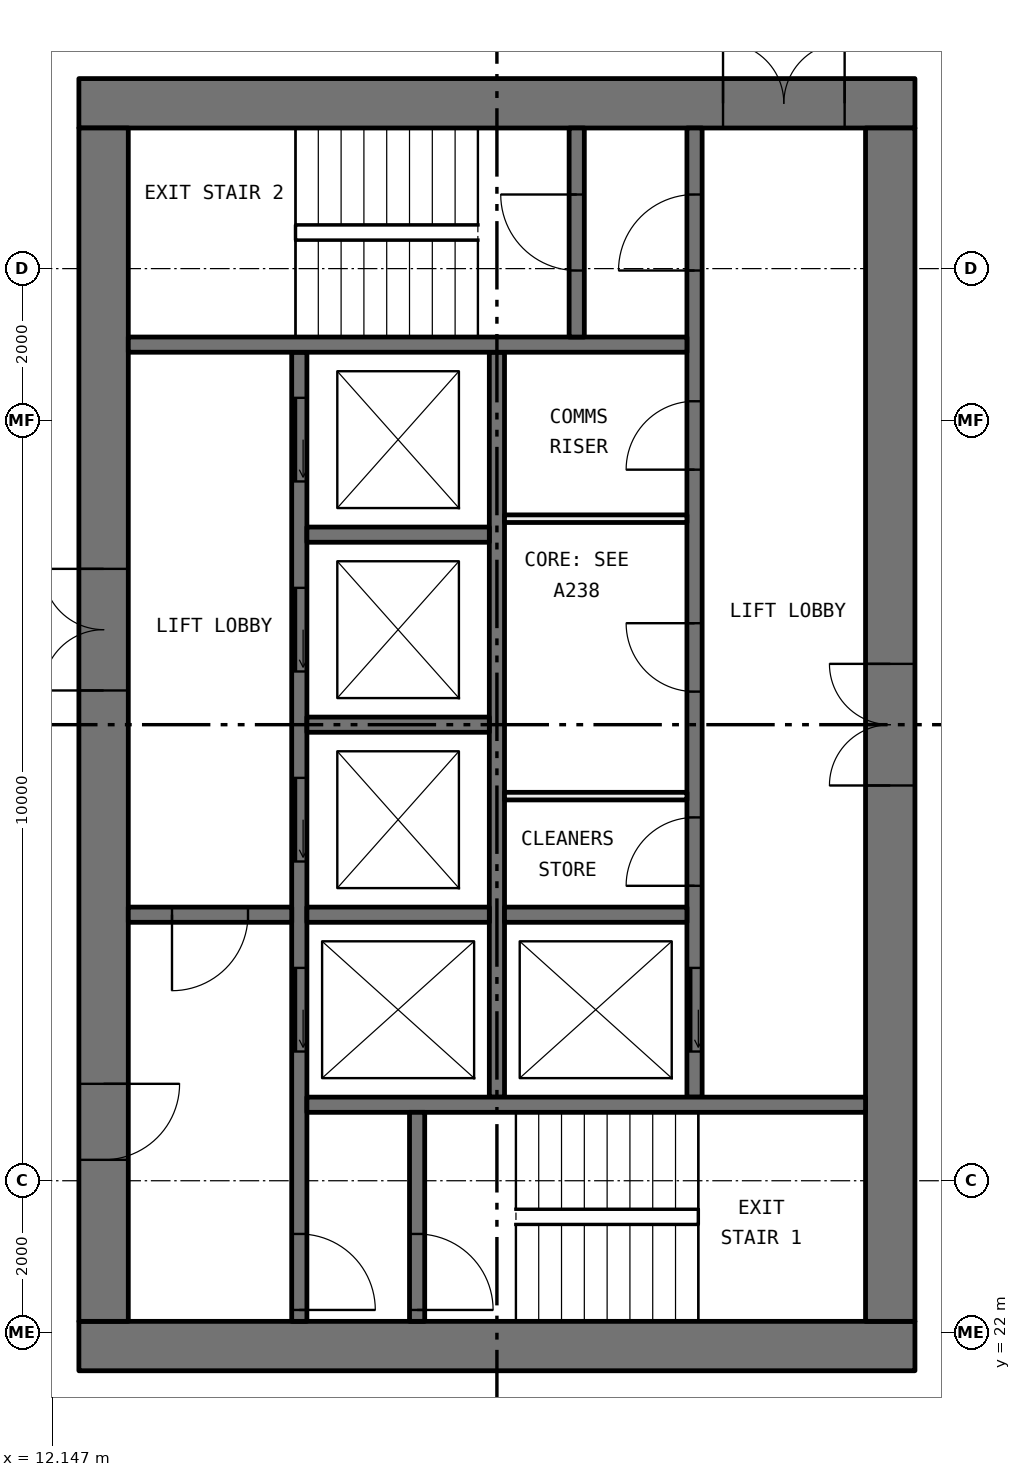
"""IFC4 building model, lengths in metres.
Left out: names, types, materials, properties, quantities, classifications, styles, units other than length and angle.
Written with IfcOpenShell. Run it as: python <this file> out.ifc"""

import sys

from ifc_helpers import new_model, si_unit, direction, frame, frame_2d, origin, place, context, subcontext, project, spatial, rectangle, extrude, element, fill, save


model = new_model("IFC4")
c1 = context("Model", 3, precision=1e-05, world=origin(), true_north=direction((0.0, 1.0)))
c2 = subcontext(c1, "Body", "Model", "MODEL_VIEW")
j1 = project(units=[si_unit("LENGTHUNIT", "METRE"), si_unit("PLANEANGLEUNIT", "RADIAN")], contexts=[c1])
p1 = place(None, origin())
s1 = spatial("IfcSite", under=j1, at=p1, CompositionType="ELEMENT")
p2 = place(p1, origin())
s2 = spatial("IfcBuilding", under=s1, at=p2, CompositionType="ELEMENT")
p3 = place(p2, frame((0.0, 0.0, 141.45)))
s3 = spatial("IfcBuildingStorey", under=s2, at=p3, CompositionType="ELEMENT", Elevation=141.45)
p4 = place(p3, frame((12.5, 21.825, 0.0), z_axis=(0.0, 0.0, 1.0), x_axis=(1.0, 0.0, 0.0)))
e1 = element("IfcWall", 1, at=p4, inside=s3, PredefinedType="SHEAR", context=c2, shape_type="SweptSolid", body=[
    extrude(rectangle(XDim=11.0, YDim=0.65, at=frame_2d((5.5, 0.0))), origin(), (0.0, 0.0, 1.0), 3.05),
])
p5 = place(p3, frame((12.5, 38.175, 0.0), z_axis=(0.0, 0.0, 1.0), x_axis=(1.0, 0.0, 0.0)))
e2 = element("IfcWall", 2, at=p5, inside=s3, PredefinedType="SHEAR", context=c2, shape_type="SweptSolid", body=[
    extrude(rectangle(XDim=11.0, YDim=0.65, at=frame_2d((5.5, 0.0))), origin(), (0.0, 0.0, 1.0), 3.05),
])
p6 = place(p5, frame((8.475, 0.0, 0.0)))
e3 = element("IfcOpeningElement", 3, at=p6, cuts=e2, PredefinedType="OPENING", context=c2, shape_type="SweptSolid", body=[
    extrude(rectangle(XDim=1.6, YDim=2.1, at=frame_2d((0.8, 1.05))), frame((0.0, 0.335, 0.0), z_axis=(0.0, -1.0, 0.0), x_axis=(1.0, 0.0, 0.0)), (0.0, 0.0, 1.0), 0.67),
])
p7 = place(p3, frame((12.825, 22.15, 0.0), z_axis=(0.0, 0.0, 1.0), x_axis=(0.0, 1.0, 0.0)))
e4 = element("IfcWall", 4, at=p7, inside=s3, PredefinedType="SHEAR", context=c2, shape_type="SweptSolid", body=[
    extrude(rectangle(XDim=15.7, YDim=0.65, at=frame_2d((7.85, 0.0))), origin(), (0.0, 0.0, 1.0), 3.05),
])
p8 = place(p7, frame((8.3, 0.0, 0.0)))
e5 = element("IfcOpeningElement", 5, at=p8, cuts=e4, PredefinedType="OPENING", context=c2, shape_type="SweptSolid", body=[
    extrude(rectangle(XDim=1.6, YDim=2.1, at=frame_2d((0.8, 1.05))), frame((0.0, 0.335, 0.0), z_axis=(0.0, -1.0, 0.0), x_axis=(1.0, 0.0, 0.0)), (0.0, 0.0, 1.0), 0.67),
])
p9 = place(p7, frame((2.125, 0.0, 0.0)))
e6 = element("IfcOpeningElement", 6, at=p9, cuts=e4, PredefinedType="OPENING", context=c2, shape_type="SweptSolid", body=[
    extrude(rectangle(XDim=1.0, YDim=2.1, at=frame_2d((0.5, 1.05))), frame((0.0, 0.335, 0.0), z_axis=(0.0, -1.0, 0.0), x_axis=(1.0, 0.0, 0.0)), (0.0, 0.0, 1.0), 0.67),
])
p10 = place(p3, frame((23.175, 22.15, 0.0), z_axis=(0.0, 0.0, 1.0), x_axis=(0.0, 1.0, 0.0)))
e7 = element("IfcWall", 7, at=p10, inside=s3, PredefinedType="SHEAR", context=c2, shape_type="SweptSolid", body=[
    extrude(rectangle(XDim=15.7, YDim=0.65, at=frame_2d((7.85, 0.0))), origin(), (0.0, 0.0, 1.0), 3.05),
])
p11 = place(p10, frame((7.05, 0.0, 0.0)))
e8 = element("IfcOpeningElement", 8, at=p11, cuts=e7, PredefinedType="OPENING", context=c2, shape_type="SweptSolid", body=[
    extrude(rectangle(XDim=1.6, YDim=2.1, at=frame_2d((0.8, 1.05))), frame((0.0, 0.335, 0.0), z_axis=(0.0, -1.0, 0.0), x_axis=(1.0, 0.0, 0.0)), (0.0, 0.0, 1.0), 0.67),
])
p12 = place(p3, frame((15.4, 22.15, 0.0), z_axis=(0.0, 0.0, 1.0), x_axis=(0.0, 1.0, 0.0)))
e9 = element("IfcWall", 9, at=p12, inside=s3, PredefinedType="SOLIDWALL", context=c2, shape_type="SweptSolid", body=[
    extrude(rectangle(XDim=12.75, YDim=0.2, at=frame_2d((6.375, 0.0))), origin(), (0.0, 0.0, 1.0), 3.05),
])
p13 = place(p12, frame((3.55, 0.0, 0.0)))
e10 = element("IfcOpeningElement", 10, at=p13, cuts=e9, PredefinedType="OPENING", context=c2, shape_type="SweptSolid", body=[
    extrude(rectangle(XDim=1.1, YDim=2.1, at=frame_2d((0.55, 1.05))), frame((0.0, 0.11, 0.0), z_axis=(0.0, -1.0, 0.0), x_axis=(1.0, 0.0, 0.0)), (0.0, 0.0, 1.0), 0.22),
])
p14 = place(p12, frame((6.05, 0.0, 0.0)))
e11 = element("IfcOpeningElement", 11, at=p14, cuts=e9, PredefinedType="OPENING", context=c2, shape_type="SweptSolid", body=[
    extrude(rectangle(XDim=1.1, YDim=2.1, at=frame_2d((0.55, 1.05))), frame((0.0, 0.11, 0.0), z_axis=(0.0, -1.0, 0.0), x_axis=(1.0, 0.0, 0.0)), (0.0, 0.0, 1.0), 0.22),
])
p15 = place(p12, frame((8.55, 0.0, 0.0)))
e12 = element("IfcOpeningElement", 12, at=p15, cuts=e9, PredefinedType="OPENING", context=c2, shape_type="SweptSolid", body=[
    extrude(rectangle(XDim=1.1, YDim=2.1, at=frame_2d((0.55, 1.05))), frame((0.0, 0.11, 0.0), z_axis=(0.0, -1.0, 0.0), x_axis=(1.0, 0.0, 0.0)), (0.0, 0.0, 1.0), 0.22),
])
p16 = place(p12, frame((11.05, 0.0, 0.0)))
e13 = element("IfcOpeningElement", 13, at=p16, cuts=e9, PredefinedType="OPENING", context=c2, shape_type="SweptSolid", body=[
    extrude(rectangle(XDim=1.1, YDim=2.1, at=frame_2d((0.55, 1.05))), frame((0.0, 0.11, 0.0), z_axis=(0.0, -1.0, 0.0), x_axis=(1.0, 0.0, 0.0)), (0.0, 0.0, 1.0), 0.22),
])
p17 = place(p12, frame((0.15, 0.0, 0.0)))
e14 = element("IfcOpeningElement", 14, at=p17, cuts=e9, PredefinedType="OPENING", context=c2, shape_type="SweptSolid", body=[
    extrude(rectangle(XDim=1.0, YDim=2.1, at=frame_2d((0.5, 1.05))), frame((0.0, 0.11, 0.0), z_axis=(0.0, -1.0, 0.0), x_axis=(1.0, 0.0, 0.0)), (0.0, 0.0, 1.0), 0.22),
])
p18 = place(p3, frame((20.6, 25.1, 0.0), z_axis=(0.0, 0.0, 1.0), x_axis=(0.0, 1.0, 0.0)))
e15 = element("IfcWall", 15, at=p18, inside=s3, PredefinedType="SOLIDWALL", context=c2, shape_type="SweptSolid", body=[
    extrude(rectangle(XDim=12.75, YDim=0.2, at=frame_2d((6.375, 0.0))), origin(), (0.0, 0.0, 1.0), 3.05),
])
p19 = place(p18, frame((0.6, 0.0, 0.0)))
e16 = element("IfcOpeningElement", 16, at=p19, cuts=e15, PredefinedType="OPENING", context=c2, shape_type="SweptSolid", body=[
    extrude(rectangle(XDim=1.1, YDim=2.1, at=frame_2d((0.55, 1.05))), frame((0.0, 0.11, 0.0), z_axis=(0.0, -1.0, 0.0), x_axis=(1.0, 0.0, 0.0)), (0.0, 0.0, 1.0), 0.22),
])
p20 = place(p18, frame((10.875, 0.0, 0.0)))
e17 = element("IfcOpeningElement", 17, at=p20, cuts=e15, PredefinedType="OPENING", context=c2, shape_type="SweptSolid", body=[
    extrude(rectangle(XDim=1.0, YDim=2.1, at=frame_2d((0.5, 1.05))), frame((0.0, 0.11, 0.0), z_axis=(0.0, -1.0, 0.0), x_axis=(1.0, 0.0, 0.0)), (0.0, 0.0, 1.0), 0.22),
])
p21 = place(p18, frame((2.78, 0.0, 0.0)))
e18 = element("IfcOpeningElement", 18, at=p21, cuts=e15, PredefinedType="OPENING", context=c2, shape_type="SweptSolid", body=[
    extrude(rectangle(XDim=0.9, YDim=2.1, at=frame_2d((0.45, 1.05))), frame((0.0, 0.11, 0.0), z_axis=(0.0, -1.0, 0.0), x_axis=(1.0, 0.0, 0.0)), (0.0, 0.0, 1.0), 0.22),
])
p22 = place(p18, frame((5.335, 0.0, 0.0)))
e19 = element("IfcOpeningElement", 19, at=p22, cuts=e15, PredefinedType="OPENING", context=c2, shape_type="SweptSolid", body=[
    extrude(rectangle(XDim=0.9, YDim=2.1, at=frame_2d((0.45, 1.05))), frame((0.0, 0.11, 0.0), z_axis=(0.0, -1.0, 0.0), x_axis=(1.0, 0.0, 0.0)), (0.0, 0.0, 1.0), 0.22),
])
p23 = place(p18, frame((8.255, 0.0, 0.0)))
e20 = element("IfcOpeningElement", 20, at=p23, cuts=e15, PredefinedType="OPENING", context=c2, shape_type="SweptSolid", body=[
    extrude(rectangle(XDim=0.9, YDim=2.1, at=frame_2d((0.45, 1.05))), frame((0.0, 0.11, 0.0), z_axis=(0.0, -1.0, 0.0), x_axis=(1.0, 0.0, 0.0)), (0.0, 0.0, 1.0), 0.22),
])
p24 = place(p3, frame((18.0, 25.1, 0.0), z_axis=(0.0, 0.0, 1.0), x_axis=(0.0, 1.0, 0.0)))
e21 = element("IfcWall", 21, at=p24, inside=s3, PredefinedType="SOLIDWALL", context=c2, shape_type="SweptSolid", body=[
    extrude(rectangle(XDim=9.8, YDim=0.2, at=frame_2d((4.9, 0.0))), origin(), (0.0, 0.0, 1.0), 3.05),
])
for number, where, z_axis, x_axis in (
    (22, (15.5, 25.0, 0.0), (0.0, 0.0, 1.0), (1.0, 0.0, 0.0)),
    (23, (13.15, 35.0, 0.0), (0.0, 0.0, 1.0), (1.0, 0.0, 0.0)),
):
    element("IfcWall", number, at=place(p3, frame(where, z_axis=z_axis, x_axis=x_axis)), inside=s3, PredefinedType="SOLIDWALL", context=c2, shape_type="SweptSolid", body=[
        extrude(rectangle(XDim=7.35, YDim=0.2, at=frame_2d((3.675, 0.0))), origin(), (0.0, 0.0, 1.0), 3.05),
    ])
p25 = place(p3, frame((13.15, 27.5, 0.0), z_axis=(0.0, 0.0, 1.0), x_axis=(1.0, 0.0, 0.0)))
e24 = element("IfcWall", 24, at=p25, inside=s3, PredefinedType="SOLIDWALL", context=c2, shape_type="SweptSolid", body=[
    extrude(rectangle(XDim=2.15, YDim=0.2, at=frame_2d((1.075, 0.0))), origin(), (0.0, 0.0, 1.0), 3.05),
])
p26 = place(p25, frame((0.575, 0.0, 0.0)))
e25 = element("IfcOpeningElement", 25, at=p26, cuts=e24, PredefinedType="OPENING", context=c2, shape_type="SweptSolid", body=[
    extrude(rectangle(XDim=1.0, YDim=2.1, at=frame_2d((0.5, 1.05))), frame((0.0, 0.11, 0.0), z_axis=(0.0, -1.0, 0.0), x_axis=(1.0, 0.0, 0.0)), (0.0, 0.0, 1.0), 0.22),
])
p27 = place(p3, frame((16.95, 22.15, 0.0), z_axis=(0.0, 0.0, 1.0), x_axis=(0.0, 1.0, 0.0)))
e26 = element("IfcWall", 26, at=p27, inside=s3, PredefinedType="SOLIDWALL", context=c2, shape_type="SweptSolid", body=[
    extrude(rectangle(XDim=2.75, YDim=0.2, at=frame_2d((1.375, 0.0))), origin(), (0.0, 0.0, 1.0), 3.05),
])
p28 = place(p27, frame((0.15, 0.0, 0.0)))
e27 = element("IfcOpeningElement", 27, at=p28, cuts=e26, PredefinedType="OPENING", context=c2, shape_type="SweptSolid", body=[
    extrude(rectangle(XDim=1.0, YDim=2.1, at=frame_2d((0.5, 1.05))), frame((0.0, 0.11, 0.0), z_axis=(0.0, -1.0, 0.0), x_axis=(1.0, 0.0, 0.0)), (0.0, 0.0, 1.0), 0.22),
])
p29 = place(p3, frame((19.05, 35.1, 0.0), z_axis=(0.0, 0.0, 1.0), x_axis=(0.0, 1.0, 0.0)))
e28 = element("IfcWall", 28, at=p29, inside=s3, PredefinedType="SOLIDWALL", context=c2, shape_type="SweptSolid", body=[
    extrude(rectangle(XDim=2.75, YDim=0.2, at=frame_2d((1.375, 0.0))), origin(), (0.0, 0.0, 1.0), 3.05),
])
p30 = place(p29, frame((0.875, 0.0, 0.0)))
e29 = element("IfcOpeningElement", 29, at=p30, cuts=e28, PredefinedType="OPENING", context=c2, shape_type="SweptSolid", body=[
    extrude(rectangle(XDim=1.0, YDim=2.1, at=frame_2d((0.5, 1.05))), frame((0.0, 0.11, 0.0), z_axis=(0.0, -1.0, 0.0), x_axis=(1.0, 0.0, 0.0)), (0.0, 0.0, 1.0), 0.22),
])
for number, where, z_axis, x_axis in (
    (30, (15.5, 27.5, 0.0), (0.0, 0.0, 1.0), (1.0, 0.0, 0.0)),
    (31, (15.5, 30.0, 0.0), (0.0, 0.0, 1.0), (1.0, 0.0, 0.0)),
    (32, (15.5, 32.5, 0.0), (0.0, 0.0, 1.0), (1.0, 0.0, 0.0)),
    (33, (18.1, 27.5, 0.0), (0.0, 0.0, 1.0), (1.0, 0.0, 0.0)),
):
    element("IfcWall", number, at=place(p3, frame(where, z_axis=z_axis, x_axis=x_axis)), inside=s3, PredefinedType="SOLIDWALL", context=c2, shape_type="SweptSolid", body=[
        extrude(rectangle(XDim=2.4, YDim=0.2, at=frame_2d((1.2, 0.0))), origin(), (0.0, 0.0, 1.0), 3.05),
    ])
for number, where, z_axis, x_axis in (
    (34, (18.1, 29.06, 0.0), (0.0, 0.0, 1.0), (1.0, 0.0, 0.0)),
    (35, (18.1, 32.71, 0.0), (0.0, 0.0, 1.0), (1.0, 0.0, 0.0)),
):
    element("IfcWall", number, at=place(p3, frame(where, z_axis=z_axis, x_axis=x_axis)), inside=s3, PredefinedType="PARTITIONING", context=c2, shape_type="SweptSolid", body=[
        extrude(rectangle(XDim=2.4, YDim=0.1, at=frame_2d((1.2, 0.0))), origin(), (0.0, 0.0, 1.0), 3.05),
    ])
p31 = place(p19, origin())
e36 = element("IfcDoor", 36, at=p31, inside=s3, OperationType="SLIDING_TO_LEFT", PredefinedType="DOOR", context=c2, shape_type="SweptSolid", body=[
    extrude(rectangle(XDim=1.1, YDim=2.1, at=frame_2d((0.55, 1.05))), frame((0.0, 0.025, 0.0), z_axis=(0.0, -1.0, 0.0), x_axis=(1.0, 0.0, 0.0)), (0.0, 0.0, 1.0), 0.05),
])
fill(e16, e36)
p32 = place(p13, origin())
e37 = element("IfcDoor", 37, at=p32, inside=s3, OperationType="SLIDING_TO_LEFT", PredefinedType="DOOR", context=c2, shape_type="SweptSolid", body=[
    extrude(rectangle(XDim=1.1, YDim=2.1, at=frame_2d((0.55, 1.05))), frame((0.0, 0.025, 0.0), z_axis=(0.0, -1.0, 0.0), x_axis=(1.0, 0.0, 0.0)), (0.0, 0.0, 1.0), 0.05),
])
fill(e10, e37)
p33 = place(p14, origin())
e38 = element("IfcDoor", 38, at=p33, inside=s3, OperationType="SLIDING_TO_LEFT", PredefinedType="DOOR", context=c2, shape_type="SweptSolid", body=[
    extrude(rectangle(XDim=1.1, YDim=2.1, at=frame_2d((0.55, 1.05))), frame((0.0, 0.025, 0.0), z_axis=(0.0, -1.0, 0.0), x_axis=(1.0, 0.0, 0.0)), (0.0, 0.0, 1.0), 0.05),
])
fill(e11, e38)
p34 = place(p15, origin())
e39 = element("IfcDoor", 39, at=p34, inside=s3, OperationType="SLIDING_TO_LEFT", PredefinedType="DOOR", context=c2, shape_type="SweptSolid", body=[
    extrude(rectangle(XDim=1.1, YDim=2.1, at=frame_2d((0.55, 1.05))), frame((0.0, 0.025, 0.0), z_axis=(0.0, -1.0, 0.0), x_axis=(1.0, 0.0, 0.0)), (0.0, 0.0, 1.0), 0.05),
])
fill(e12, e39)
p35 = place(p16, origin())
e40 = element("IfcDoor", 40, at=p35, inside=s3, OperationType="SLIDING_TO_LEFT", PredefinedType="DOOR", context=c2, shape_type="SweptSolid", body=[
    extrude(rectangle(XDim=1.1, YDim=2.1, at=frame_2d((0.55, 1.05))), frame((0.0, 0.025, 0.0), z_axis=(0.0, -1.0, 0.0), x_axis=(1.0, 0.0, 0.0)), (0.0, 0.0, 1.0), 0.05),
])
fill(e13, e40)
p36 = place(p28, frame((1.0, 0.0, 0.0), x_axis=(-1.0, 0.0, 0.0)))
e41 = element("IfcDoor", 41, at=p36, inside=s3, OperationType="SINGLE_SWING_LEFT", PredefinedType="DOOR", context=c2, shape_type="SweptSolid", body=[
    extrude(rectangle(XDim=1.0, YDim=2.1, at=frame_2d((0.5, 1.05))), frame((0.0, 0.025, 0.0), z_axis=(0.0, -1.0, 0.0), x_axis=(1.0, 0.0, 0.0)), (0.0, 0.0, 1.0), 0.05),
])
fill(e27, e41)
p37 = place(p17, frame((1.0, 0.0, 0.0), x_axis=(-1.0, 0.0, 0.0)))
e42 = element("IfcDoor", 42, at=p37, inside=s3, OperationType="SINGLE_SWING_LEFT", PredefinedType="DOOR", context=c2, shape_type="SweptSolid", body=[
    extrude(rectangle(XDim=1.0, YDim=2.1, at=frame_2d((0.5, 1.05))), frame((0.0, 0.025, 0.0), z_axis=(0.0, -1.0, 0.0), x_axis=(1.0, 0.0, 0.0)), (0.0, 0.0, 1.0), 0.05),
])
fill(e14, e42)
p38 = place(p20, origin())
e43 = element("IfcDoor", 43, at=p38, inside=s3, OperationType="SINGLE_SWING_RIGHT", PredefinedType="DOOR", context=c2, shape_type="SweptSolid", body=[
    extrude(rectangle(XDim=1.0, YDim=2.1, at=frame_2d((0.5, 1.05))), frame((0.0, 0.025, 0.0), z_axis=(0.0, -1.0, 0.0), x_axis=(1.0, 0.0, 0.0)), (0.0, 0.0, 1.0), 0.05),
])
fill(e17, e43)
p39 = place(p30, origin())
e44 = element("IfcDoor", 44, at=p39, inside=s3, OperationType="SINGLE_SWING_LEFT", PredefinedType="DOOR", context=c2, shape_type="SweptSolid", body=[
    extrude(rectangle(XDim=1.0, YDim=2.1, at=frame_2d((0.5, 1.05))), frame((0.0, 0.025, 0.0), z_axis=(0.0, -1.0, 0.0), x_axis=(1.0, 0.0, 0.0)), (0.0, 0.0, 1.0), 0.05),
])
fill(e29, e44)
p40 = place(p26, frame((1.0, 0.0, 0.0), x_axis=(-1.0, 0.0, 0.0)))
e45 = element("IfcDoor", 45, at=p40, inside=s3, OperationType="SINGLE_SWING_LEFT", PredefinedType="DOOR", context=c2, shape_type="SweptSolid", body=[
    extrude(rectangle(XDim=1.0, YDim=2.1, at=frame_2d((0.5, 1.05))), frame((0.0, 0.025, 0.0), z_axis=(0.0, -1.0, 0.0), x_axis=(1.0, 0.0, 0.0)), (0.0, 0.0, 1.0), 0.05),
])
fill(e25, e45)
p41 = place(p8, origin())
e46 = element("IfcDoor", 46, at=p41, inside=s3, OperationType="DOUBLE_DOOR_SINGLE_SWING", PredefinedType="DOOR", context=c2, shape_type="SweptSolid", body=[
    extrude(rectangle(XDim=1.6, YDim=2.1, at=frame_2d((0.8, 1.05))), frame((0.0, 0.025, 0.0), z_axis=(0.0, -1.0, 0.0), x_axis=(1.0, 0.0, 0.0)), (0.0, 0.0, 1.0), 0.05),
])
fill(e5, e46)
p42 = place(p9, frame((1.0, 0.0, 0.0), x_axis=(-1.0, 0.0, 0.0)))
e47 = element("IfcDoor", 47, at=p42, inside=s3, OperationType="SINGLE_SWING_RIGHT", PredefinedType="DOOR", context=c2, shape_type="SweptSolid", body=[
    extrude(rectangle(XDim=1.0, YDim=2.1, at=frame_2d((0.5, 1.05))), frame((0.0, 0.025, 0.0), z_axis=(0.0, -1.0, 0.0), x_axis=(1.0, 0.0, 0.0)), (0.0, 0.0, 1.0), 0.05),
])
fill(e6, e47)
p43 = place(p6, origin())
e48 = element("IfcDoor", 48, at=p43, inside=s3, OperationType="DOUBLE_DOOR_SINGLE_SWING", PredefinedType="DOOR", context=c2, shape_type="SweptSolid", body=[
    extrude(rectangle(XDim=1.6, YDim=2.1, at=frame_2d((0.8, 1.05))), frame((0.0, 0.025, 0.0), z_axis=(0.0, -1.0, 0.0), x_axis=(1.0, 0.0, 0.0)), (0.0, 0.0, 1.0), 0.05),
])
fill(e3, e48)
p44 = place(p11, origin())
e49 = element("IfcDoor", 49, at=p44, inside=s3, OperationType="DOUBLE_DOOR_SINGLE_SWING", PredefinedType="DOOR", context=c2, shape_type="SweptSolid", body=[
    extrude(rectangle(XDim=1.6, YDim=2.1, at=frame_2d((0.8, 1.05))), frame((0.0, 0.025, 0.0), z_axis=(0.0, -1.0, 0.0), x_axis=(1.0, 0.0, 0.0)), (0.0, 0.0, 1.0), 0.05),
])
fill(e8, e49)
p45 = place(p21, origin())
e50 = element("IfcDoor", 50, at=p45, inside=s3, OperationType="SINGLE_SWING_RIGHT", PredefinedType="DOOR", context=c2, shape_type="SweptSolid", body=[
    extrude(rectangle(XDim=0.9, YDim=2.1, at=frame_2d((0.45, 1.05))), frame((0.0, 0.025, 0.0), z_axis=(0.0, -1.0, 0.0), x_axis=(1.0, 0.0, 0.0)), (0.0, 0.0, 1.0), 0.05),
])
fill(e18, e50)
p46 = place(p22, origin())
e51 = element("IfcDoor", 51, at=p46, inside=s3, OperationType="SINGLE_SWING_LEFT", PredefinedType="DOOR", context=c2, shape_type="SweptSolid", body=[
    extrude(rectangle(XDim=0.9, YDim=2.1, at=frame_2d((0.45, 1.05))), frame((0.0, 0.025, 0.0), z_axis=(0.0, -1.0, 0.0), x_axis=(1.0, 0.0, 0.0)), (0.0, 0.0, 1.0), 0.05),
])
fill(e19, e51)
p47 = place(p23, origin())
e52 = element("IfcDoor", 52, at=p47, inside=s3, OperationType="SINGLE_SWING_RIGHT", PredefinedType="DOOR", context=c2, shape_type="SweptSolid", body=[
    extrude(rectangle(XDim=0.9, YDim=2.1, at=frame_2d((0.45, 1.05))), frame((0.0, 0.025, 0.0), z_axis=(0.0, -1.0, 0.0), x_axis=(1.0, 0.0, 0.0)), (0.0, 0.0, 1.0), 0.05),
])
fill(e20, e52)
save(model, sys.argv[1])
